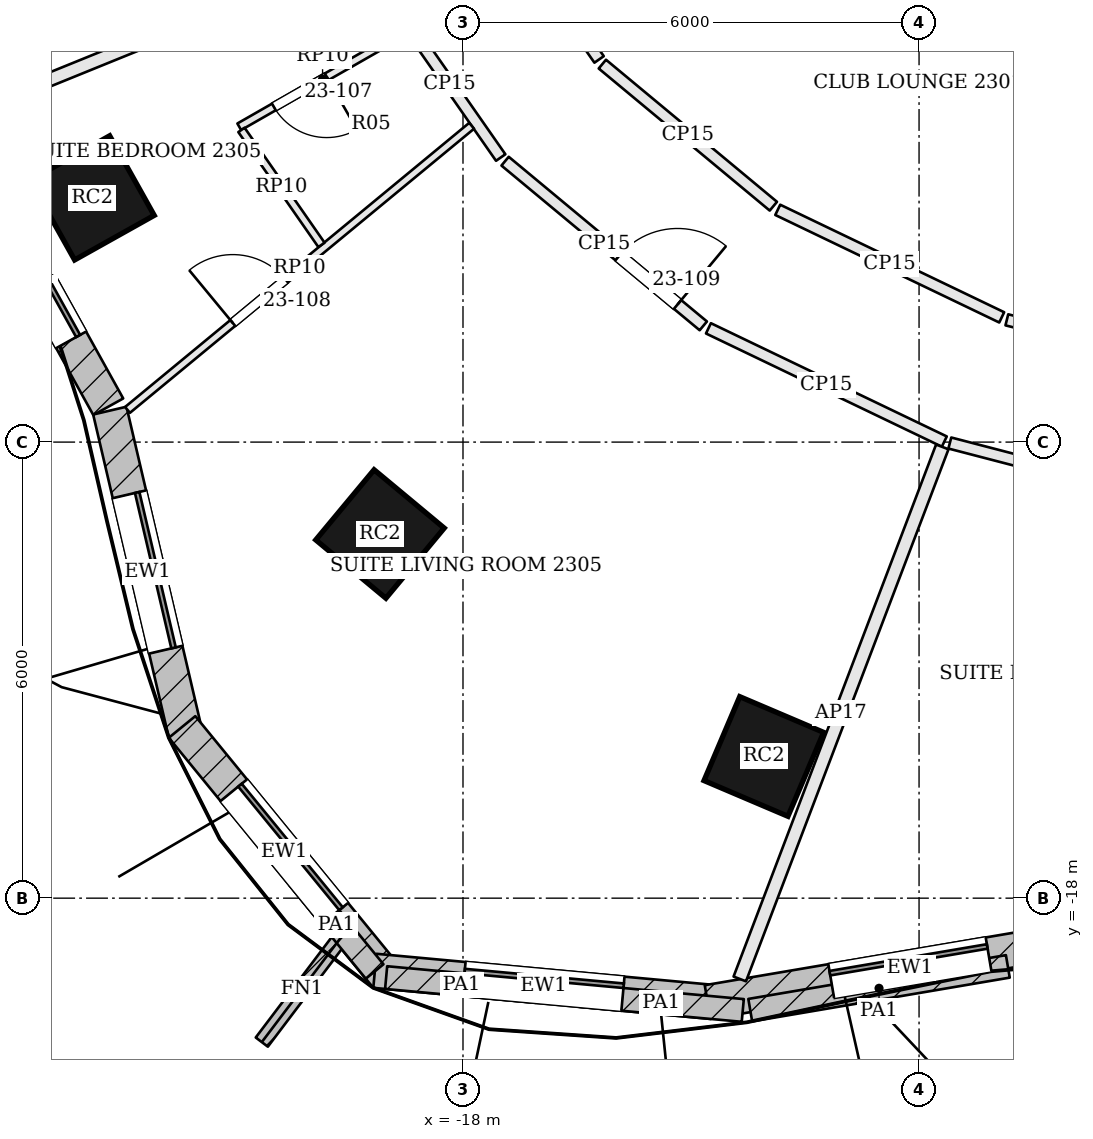
"""IFC4 building model, lengths in metres.
Left out: names, types, materials, properties, quantities, classifications, styles, units other than length and angle.
Written with IfcOpenShell. Run it as: python <this file> out.ifc"""

import sys

from ifc_helpers import new_model, si_unit, direction, frame, frame_2d, origin, origin_2d, place, context, subcontext, project, spatial, rectangle, extrude, element, fill, save


model = new_model("IFC4")
c1 = context("Model", 3, precision=1e-05, world=origin(), true_north=direction((0.0, 1.0)))
c2 = subcontext(c1, "Body", "Model", "MODEL_VIEW")
j1 = project(units=[si_unit("LENGTHUNIT", "METRE"), si_unit("PLANEANGLEUNIT", "RADIAN")], contexts=[c1])
p1 = place(None, origin())
s1 = spatial("IfcSite", under=j1, at=p1, CompositionType="ELEMENT")
p2 = place(p1, origin())
s2 = spatial("IfcBuilding", under=s1, at=p2, CompositionType="ELEMENT")
p3 = place(p2, frame((0.0, 0.0, 99.6)))
s3 = spatial("IfcBuildingStorey", under=s2, at=p3, CompositionType="ELEMENT", Elevation=99.6)
for number, where, z_axis, x_axis in (
    (1, (-22.879, -8.787, 0.0), (0.0, 0.0, 1.0), (0.489, -0.873, 0.0)),
    (2, (-19.092, -13.209, 0.0), (0.0, 0.0, 1.0), (0.769, -0.639, 0.0)),
    (3, (-14.042, -16.136, 0.0), (0.0, 0.0, 1.0), (0.92, -0.392, 0.0)),
):
    element("IfcColumn", number, at=place(p3, frame(where, z_axis=z_axis, x_axis=x_axis)), inside=s3, PredefinedType="COLUMN", context=c2, shape_type="SweptSolid", body=[
        extrude(rectangle(XDim=1.2, YDim=1.2, at=origin_2d()), origin(), (0.0, 0.0, 1.0), 3.6),
    ])
p4 = place(p3, frame((-24.662, -7.939, 0.0), z_axis=(0.0, 0.0, 1.0), x_axis=(0.485153910721, -0.874428775208, 0.0)))
e4 = element("IfcWall", 4, at=p4, inside=s3, PredefinedType="SOLIDWALL", context=c2, shape_type="SweptSolid", body=[
    extrude(rectangle(XDim=4.112, YDim=0.45, at=frame_2d((2.056, 0.0))), origin(), (0.0, 0.0, 1.0), 3.4),
])
p5 = place(p4, frame((1.006, 0.0, 0.9)))
e5 = element("IfcOpeningElement", 5, at=p5, cuts=e4, PredefinedType="OPENING", context=c2, shape_type="SweptSolid", body=[
    extrude(rectangle(XDim=2.1, YDim=2.0, at=frame_2d((1.05, 1.0))), frame((0.0, 0.235, 0.0), z_axis=(0.0, -1.0, 0.0), x_axis=(1.0, 0.0, 0.0)), (0.0, 0.0, 1.0), 0.47),
])
p6 = place(p3, frame((-22.646, -11.586, 0.0), z_axis=(0.0, 0.0, 1.0), x_axis=(0.227925124198, -0.973678662475, 0.0)))
e6 = element("IfcWall", 6, at=p6, inside=s3, PredefinedType="SOLIDWALL", context=c2, shape_type="SweptSolid", body=[
    extrude(rectangle(XDim=4.361, YDim=0.45, at=frame_2d((2.18, 0.0))), origin(), (0.0, 0.0, 1.0), 3.4),
])
p7 = place(p6, frame((1.13, 0.0, 0.9)))
e7 = element("IfcOpeningElement", 7, at=p7, cuts=e6, PredefinedType="OPENING", context=c2, shape_type="SweptSolid", body=[
    extrude(rectangle(XDim=2.1, YDim=2.0, at=frame_2d((1.05, 1.0))), frame((0.0, 0.235, 0.0), z_axis=(0.0, -1.0, 0.0), x_axis=(1.0, 0.0, 0.0)), (0.0, 0.0, 1.0), 0.47),
])
p8 = place(p3, frame((-21.696, -15.748, 0.0), z_axis=(0.0, 0.0, 1.0), x_axis=(0.632968710519, -0.774177377288, 0.0)))
e8 = element("IfcWall", 8, at=p8, inside=s3, PredefinedType="SOLIDWALL", context=c2, shape_type="SweptSolid", body=[
    extrude(rectangle(XDim=4.25, YDim=0.45, at=frame_2d((2.125, 0.0))), origin(), (0.0, 0.0, 1.0), 3.4),
])
p9 = place(p8, frame((1.075, 0.0, 0.9)))
e9 = element("IfcOpeningElement", 9, at=p9, cuts=e8, PredefinedType="OPENING", context=c2, shape_type="SweptSolid", body=[
    extrude(rectangle(XDim=2.1, YDim=2.0, at=frame_2d((1.05, 1.0))), frame((0.0, 0.235, 0.0), z_axis=(0.0, -1.0, 0.0), x_axis=(1.0, 0.0, 0.0)), (0.0, 0.0, 1.0), 0.47),
])
p10 = place(p3, frame((-19.159, -18.956, 0.0), z_axis=(0.0, 0.0, 1.0), x_axis=(0.995777399421, -0.091800712424, 0.0)))
e10 = element("IfcWall", 10, at=p10, inside=s3, PredefinedType="SOLIDWALL", context=c2, shape_type="SweptSolid", body=[
    extrude(rectangle(XDim=4.455, YDim=0.45, at=frame_2d((2.227, 0.0))), origin(), (0.0, 0.0, 1.0), 3.4),
])
p11 = place(p10, frame((1.177, 0.0, 0.9)))
e11 = element("IfcOpeningElement", 11, at=p11, cuts=e10, PredefinedType="OPENING", context=c2, shape_type="SweptSolid", body=[
    extrude(rectangle(XDim=2.1, YDim=2.0, at=frame_2d((1.05, 1.0))), frame((0.0, 0.235, 0.0), z_axis=(0.0, -1.0, 0.0), x_axis=(1.0, 0.0, 0.0)), (0.0, 0.0, 1.0), 0.47),
])
p12 = place(p3, frame((-14.782, -19.367, 0.0), z_axis=(0.0, 0.0, 1.0), x_axis=(0.98585584667, 0.167595493934, 0.0)))
e12 = element("IfcWall", 12, at=p12, inside=s3, PredefinedType="SOLIDWALL", context=c2, shape_type="SweptSolid", body=[
    extrude(rectangle(XDim=5.399, YDim=0.45, at=frame_2d((2.699, 0.0))), origin(), (0.0, 0.0, 1.0), 3.4),
])
p13 = place(p12, frame((1.649, 0.0, 0.9)))
e13 = element("IfcOpeningElement", 13, at=p13, cuts=e12, PredefinedType="OPENING", context=c2, shape_type="SweptSolid", body=[
    extrude(rectangle(XDim=2.1, YDim=2.0, at=frame_2d((1.05, 1.0))), frame((0.0, 0.235, 0.0), z_axis=(0.0, -1.0, 0.0), x_axis=(1.0, 0.0, 0.0)), (0.0, 0.0, 1.0), 0.47),
])
p14 = place(p3, frame((-19.591, -18.498, 0.0), z_axis=(0.0, 0.0, 1.0), x_axis=(-0.603387525063, -0.797448114048, 0.0)))
e14 = element("IfcWall", 14, at=p14, inside=s3, PredefinedType="SOLIDWALL", context=c2, shape_type="SweptSolid", body=[
    extrude(rectangle(XDim=1.75, YDim=0.2, at=frame_2d((0.875, 0.0))), origin(), (0.0, 0.0, 1.0), 3.4),
])
p15 = place(p3, frame((-20.168, -17.734, 3.6), z_axis=(0.0, 0.0, 1.0), x_axis=(0.632995189145, -0.774155727564, 0.0)))
e15 = element("IfcWall", 15, at=p15, inside=s3, PredefinedType="PARAPET", context=c2, shape_type="SweptSolid", body=[
    extrude(rectangle(XDim=1.589, YDim=0.3, at=frame_2d((0.795, 0.0))), origin(), (0.0, 0.0, 1.0), 1.1),
])
p16 = place(p3, frame((-19.011, -19.045, 3.6), z_axis=(0.0, 0.0, 1.0), x_axis=(0.995779953678, -0.09177300176, 0.0)))
e16 = element("IfcWall", 16, at=p16, inside=s3, PredefinedType="PARAPET", context=c2, shape_type="SweptSolid", body=[
    extrude(rectangle(XDim=1.992, YDim=0.3, at=frame_2d((0.996, 0.0))), origin(), (0.0, 0.0, 1.0), 1.1),
])
p17 = place(p3, frame((-16.462, -19.28, 3.6), z_axis=(0.0, 0.0, 1.0), x_axis=(0.995778015376, -0.091794030816, 0.0)))
e17 = element("IfcWall", 17, at=p17, inside=s3, PredefinedType="PARAPET", context=c2, shape_type="SweptSolid", body=[
    extrude(rectangle(XDim=2.152, YDim=0.3, at=frame_2d((1.076, 0.0))), origin(), (0.0, 0.0, 1.0), 1.1),
])
p18 = place(p3, frame((-14.221, -19.473, 3.6), z_axis=(0.0, 0.0, 1.0), x_axis=(0.985864880964, 0.167542342353, 0.0)))
e18 = element("IfcWall", 18, at=p18, inside=s3, PredefinedType="PARAPET", context=c2, shape_type="SweptSolid", body=[
    extrude(rectangle(XDim=3.438, YDim=0.3, at=frame_2d((1.719, 0.0))), origin(), (0.0, 0.0, 1.0), 1.1),
])
p19 = place(p3, frame((-24.574, -7.692, 0.0), z_axis=(0.0, 0.0, 1.0), x_axis=(0.926441725598, 0.376438214148, 0.0)))
e19 = element("IfcWall", 19, at=p19, inside=s3, PredefinedType="PARTITIONING", context=c2, shape_type="SweptSolid", body=[
    extrude(rectangle(XDim=5.781, YDim=0.175, at=frame_2d((2.891, 0.0))), origin(), (0.0, 0.0, 1.0), 2.784),
])
p20 = place(p3, frame((-18.851, -6.325, 0.0), z_axis=(0.0, 0.0, 1.0), x_axis=(0.572090775968, -0.820190309656, 0.0)))
e20 = element("IfcWall", 20, at=p20, inside=s3, PredefinedType="PARTITIONING", context=c2, shape_type="SweptSolid", body=[
    extrude(rectangle(XDim=2.355, YDim=0.15, at=frame_2d((1.177, 0.0))), origin(), (0.0, 0.0, 1.0), 2.784),
])
p21 = place(p3, frame((-17.446, -8.304, 0.0), z_axis=(0.0, 0.0, 1.0), x_axis=(0.769200174495, -0.639007896318, 0.0)))
e21 = element("IfcWall", 21, at=p21, inside=s3, PredefinedType="PARTITIONING", context=c2, shape_type="SweptSolid", body=[
    extrude(rectangle(XDim=3.39, YDim=0.15, at=frame_2d((1.695, 0.0))), origin(), (0.0, 0.0, 1.0), 2.784),
])
p22 = place(p21, frame((1.95, 0.0, 0.0)))
e22 = element("IfcOpeningElement", 22, at=p22, cuts=e21, PredefinedType="OPENING", context=c2, shape_type="SweptSolid", body=[
    extrude(rectangle(XDim=1.0, YDim=2.1, at=frame_2d((0.5, 1.05))), frame((0.0, 0.085, 0.0), z_axis=(0.0, -1.0, 0.0), x_axis=(1.0, 0.0, 0.0)), (0.0, 0.0, 1.0), 0.17),
])
p23 = place(p3, frame((-14.771, -10.503, 0.0), z_axis=(0.0, 0.0, 1.0), x_axis=(0.901503135339, -0.432772569573, 0.0)))
e23 = element("IfcWall", 23, at=p23, inside=s3, PredefinedType="PARTITIONING", context=c2, shape_type="SweptSolid", body=[
    extrude(rectangle(XDim=3.442, YDim=0.15, at=frame_2d((1.721, 0.0))), origin(), (0.0, 0.0, 1.0), 2.784),
])
p24 = place(p3, frame((-14.359, -19.063, 0.0), z_axis=(0.0, 0.0, 1.0), x_axis=(0.355741824807, 0.934584268048, 0.0)))
e24 = element("IfcWall", 24, at=p24, inside=s3, PredefinedType="PARTITIONING", context=c2, shape_type="SweptSolid", body=[
    extrude(rectangle(XDim=7.49, YDim=0.175, at=frame_2d((3.745, 0.0))), origin(), (0.0, 0.0, 1.0), 2.784),
])
p25 = place(p3, frame((-11.595, -12.012, 0.0), z_axis=(0.0, 0.0, 1.0), x_axis=(0.967696436642, -0.252118239146, 0.0)))
e25 = element("IfcWall", 25, at=p25, inside=s3, PredefinedType="PARTITIONING", context=c2, shape_type="SweptSolid", body=[
    extrude(rectangle(XDim=4.91, YDim=0.15, at=frame_2d((2.455, 0.0))), origin(), (0.0, 0.0, 1.0), 2.784),
])
p26 = place(p3, frame((-6.617, -11.451, 0.0), z_axis=(0.0, 0.0, 1.0), x_axis=(-0.969987441267, 0.243155020069, 0.0)))
e26 = element("IfcWall", 26, at=p26, inside=s3, PredefinedType="PARTITIONING", context=c2, shape_type="SweptSolid", body=[
    extrude(rectangle(XDim=4.359, YDim=0.15, at=frame_2d((2.179, 0.0))), origin(), (0.0, 0.0, 1.0), 2.784),
])
p27 = place(p3, frame((-10.913, -10.359, 0.0), z_axis=(0.0, 0.0, 1.0), x_axis=(-0.90149741277, 0.432784489982, 0.0)))
e27 = element("IfcWall", 27, at=p27, inside=s3, PredefinedType="PARTITIONING", context=c2, shape_type="SweptSolid", body=[
    extrude(rectangle(XDim=3.269, YDim=0.15, at=frame_2d((1.634, 0.0))), origin(), (0.0, 0.0, 1.0), 2.784),
])
p28 = place(p3, frame((-13.917, -8.896, 0.0), z_axis=(0.0, 0.0, 1.0), x_axis=(-0.769130409479, 0.639091866021, 0.0)))
e28 = element("IfcWall", 28, at=p28, inside=s3, PredefinedType="PARTITIONING", context=c2, shape_type="SweptSolid", body=[
    extrude(rectangle(XDim=2.925, YDim=0.15, at=frame_2d((1.462, 0.0))), origin(), (0.0, 0.0, 1.0), 2.784),
])
p29 = place(p3, frame((-16.209, -6.966, 0.0), z_axis=(0.0, 0.0, 1.0), x_axis=(-0.572051367607, 0.820217795966, 0.0)))
e29 = element("IfcWall", 29, at=p29, inside=s3, PredefinedType="PARTITIONING", context=c2, shape_type="SweptSolid", body=[
    extrude(rectangle(XDim=1.848, YDim=0.15, at=frame_2d((0.924, 0.0))), origin(), (0.0, 0.0, 1.0), 2.784),
])
p30 = place(p3, frame((-22.414, -11.576, 0.0), z_axis=(0.0, 0.0, 1.0), x_axis=(0.771144598581, 0.636660041214, 0.0)))
e30 = element("IfcWall", 30, at=p30, inside=s3, PredefinedType="PARTITIONING", context=c2, shape_type="SweptSolid", body=[
    extrude(rectangle(XDim=5.871, YDim=0.1, at=frame_2d((2.936, 0.0))), origin(), (0.0, 0.0, 1.0), 2.784),
])
p31 = place(p30, frame((1.796, 0.0, 0.0)))
e31 = element("IfcOpeningElement", 31, at=p31, cuts=e30, PredefinedType="OPENING", context=c2, shape_type="SweptSolid", body=[
    extrude(rectangle(XDim=0.9, YDim=2.4, at=frame_2d((0.45, 1.2))), frame((0.0, 0.06, 0.0), z_axis=(0.0, -1.0, 0.0), x_axis=(1.0, 0.0, 0.0)), (0.0, 0.0, 1.0), 0.12),
])
p32 = place(p3, frame((-18.752, -6.598, 0.0), z_axis=(0.0, 0.0, 1.0), x_axis=(-0.867981215955, -0.496597028534, 0.0)))
e32 = element("IfcWall", 32, at=p32, inside=s3, PredefinedType="PARTITIONING", context=c2, shape_type="SweptSolid", body=[
    extrude(rectangle(XDim=2.525, YDim=0.1, at=frame_2d((1.262, 0.0))), origin(), (0.0, 0.0, 1.0), 2.784),
])
p33 = place(p32, frame((1.2, 0.0, 0.0)))
e33 = element("IfcOpeningElement", 33, at=p33, cuts=e32, PredefinedType="OPENING", context=c2, shape_type="SweptSolid", body=[
    extrude(rectangle(XDim=0.8, YDim=2.1, at=frame_2d((0.4, 1.05))), frame((0.0, 0.06, 0.0), z_axis=(0.0, -1.0, 0.0), x_axis=(1.0, 0.0, 0.0)), (0.0, 0.0, 1.0), 0.12),
])
p34 = place(p3, frame((-20.915, -7.893, 0.0), z_axis=(0.0, 0.0, 1.0), x_axis=(0.571281847323, -0.820753952728, 0.0)))
e34 = element("IfcWall", 34, at=p34, inside=s3, PredefinedType="PARTITIONING", context=c2, shape_type="SweptSolid", body=[
    extrude(rectangle(XDim=1.843, YDim=0.1, at=frame_2d((0.921, 0.0))), origin(), (0.0, 0.0, 1.0), 2.784),
])
p35 = place(p5, origin())
e35 = element("IfcWindow", 35, at=p35, inside=s3, PartitioningType="SINGLE_PANEL", PredefinedType="WINDOW", context=c2, shape_type="SweptSolid", body=[
    extrude(rectangle(XDim=2.1, YDim=2.0, at=frame_2d((1.05, 1.0))), frame((0.0, 0.135, 0.0), z_axis=(0.0, -1.0, 0.0), x_axis=(1.0, 0.0, 0.0)), (0.0, 0.0, 1.0), 0.06),
])
fill(e5, e35)
p36 = place(p7, origin())
e36 = element("IfcWindow", 36, at=p36, inside=s3, PartitioningType="SINGLE_PANEL", PredefinedType="WINDOW", context=c2, shape_type="SweptSolid", body=[
    extrude(rectangle(XDim=2.1, YDim=2.0, at=frame_2d((1.05, 1.0))), frame((0.0, 0.135, 0.0), z_axis=(0.0, -1.0, 0.0), x_axis=(1.0, 0.0, 0.0)), (0.0, 0.0, 1.0), 0.06),
])
fill(e7, e36)
p37 = place(p9, origin())
e37 = element("IfcWindow", 37, at=p37, inside=s3, PartitioningType="SINGLE_PANEL", PredefinedType="WINDOW", context=c2, shape_type="SweptSolid", body=[
    extrude(rectangle(XDim=2.1, YDim=2.0, at=frame_2d((1.05, 1.0))), frame((0.0, 0.135, 0.0), z_axis=(0.0, -1.0, 0.0), x_axis=(1.0, 0.0, 0.0)), (0.0, 0.0, 1.0), 0.06),
])
fill(e9, e37)
p38 = place(p11, origin())
e38 = element("IfcWindow", 38, at=p38, inside=s3, PartitioningType="SINGLE_PANEL", PredefinedType="WINDOW", context=c2, shape_type="SweptSolid", body=[
    extrude(rectangle(XDim=2.1, YDim=2.0, at=frame_2d((1.05, 1.0))), frame((0.0, 0.135, 0.0), z_axis=(0.0, -1.0, 0.0), x_axis=(1.0, 0.0, 0.0)), (0.0, 0.0, 1.0), 0.06),
])
fill(e11, e38)
p39 = place(p13, origin())
e39 = element("IfcWindow", 39, at=p39, inside=s3, PartitioningType="SINGLE_PANEL", PredefinedType="WINDOW", context=c2, shape_type="SweptSolid", body=[
    extrude(rectangle(XDim=2.1, YDim=2.0, at=frame_2d((1.05, 1.0))), frame((0.0, 0.135, 0.0), z_axis=(0.0, -1.0, 0.0), x_axis=(1.0, 0.0, 0.0)), (0.0, 0.0, 1.0), 0.06),
])
fill(e13, e39)
p40 = place(p33, origin())
e40 = element("IfcDoor", 40, at=p40, inside=s3, OperationType="SINGLE_SWING_LEFT", PredefinedType="DOOR", context=c2, shape_type="SweptSolid", body=[
    extrude(rectangle(XDim=0.8, YDim=2.1, at=frame_2d((0.4, 1.05))), frame((0.0, 0.025, 0.0), z_axis=(0.0, -1.0, 0.0), x_axis=(1.0, 0.0, 0.0)), (0.0, 0.0, 1.0), 0.05),
])
fill(e33, e40)
p41 = place(p31, origin())
e41 = element("IfcDoor", 41, at=p41, inside=s3, OperationType="SINGLE_SWING_LEFT", PredefinedType="DOOR", context=c2, shape_type="SweptSolid", body=[
    extrude(rectangle(XDim=0.9, YDim=2.4, at=frame_2d((0.45, 1.2))), frame((0.0, 0.025, 0.0), z_axis=(0.0, -1.0, 0.0), x_axis=(1.0, 0.0, 0.0)), (0.0, 0.0, 1.0), 0.05),
])
fill(e31, e41)
p42 = place(p22, origin())
e42 = element("IfcDoor", 42, at=p42, inside=s3, OperationType="SINGLE_SWING_RIGHT", PredefinedType="DOOR", context=c2, shape_type="SweptSolid", body=[
    extrude(rectangle(XDim=1.0, YDim=2.1, at=frame_2d((0.5, 1.05))), frame((0.0, 0.025, 0.0), z_axis=(0.0, -1.0, 0.0), x_axis=(1.0, 0.0, 0.0)), (0.0, 0.0, 1.0), 0.05),
])
fill(e22, e42)
save(model, sys.argv[1])
